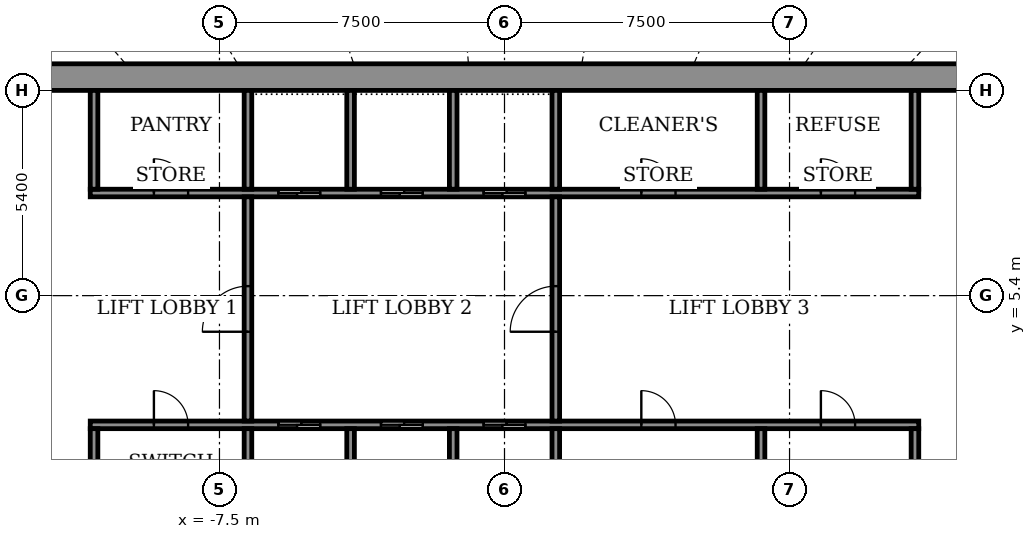
"""IFC4 building model, lengths in metres.
Left out: names, types, materials, properties, quantities, classifications, styles, units other than length and angle.
Written with IfcOpenShell. Run it as: python <this file> out.ifc"""

import sys

from ifc_helpers import new_model, si_unit, direction, frame, frame_2d, origin, place, context, subcontext, project, spatial, rectangle, extrude, element, fill, save


model = new_model("IFC4")
c1 = context("Model", 3, precision=1e-05, world=origin(), true_north=direction((0.0, 1.0)))
c2 = subcontext(c1, "Body", "Model", "MODEL_VIEW")
j1 = project(units=[si_unit("LENGTHUNIT", "METRE"), si_unit("PLANEANGLEUNIT", "RADIAN")], contexts=[c1])
p1 = place(None, origin())
s1 = spatial("IfcSite", under=j1, at=p1, CompositionType="ELEMENT")
p2 = place(p1, origin())
s2 = spatial("IfcBuilding", under=s1, at=p2, CompositionType="ELEMENT")
p3 = place(p2, frame((0.0, 0.0, 275.3)))
s3 = spatial("IfcBuildingStorey", under=s2, at=p3, CompositionType="ELEMENT", Elevation=275.3)
p4 = place(p3, frame((-14.5, 11.15, 0.0), z_axis=(0.0, 0.0, 1.0), x_axis=(1.0, 0.0, 0.0)))
e1 = element("IfcWall", 1, at=p4, inside=s3, PredefinedType="SHEAR", context=c2, shape_type="SweptSolid", body=[
    extrude(rectangle(XDim=29.0, YDim=0.7, at=frame_2d((14.5, 0.0))), origin(), (0.0, 0.0, 1.0), 4.6),
])
p5 = place(p3, frame((-10.9, 2.0, 0.0), z_axis=(0.0, 0.0, 1.0), x_axis=(1.0, 0.0, 0.0)))
e2 = element("IfcWall", 2, at=p5, inside=s3, PredefinedType="SHEAR", context=c2, shape_type="SweptSolid", body=[
    extrude(rectangle(XDim=21.8, YDim=0.2, at=frame_2d((10.9, 0.0))), origin(), (0.0, 0.0, 1.0), 4.05),
])
p6 = place(p5, frame((4.95, 0.0, 0.0)))
e3 = element("IfcOpeningElement", 3, at=p6, cuts=e2, PredefinedType="OPENING", context=c2, shape_type="SweptSolid", body=[
    extrude(rectangle(XDim=1.1, YDim=2.1, at=frame_2d((0.55, 1.05))), frame((0.0, 0.11, 0.0), z_axis=(0.0, -1.0, 0.0), x_axis=(1.0, 0.0, 0.0)), (0.0, 0.0, 1.0), 0.22),
])
p7 = place(p5, frame((7.65, 0.0, 0.0)))
e4 = element("IfcOpeningElement", 4, at=p7, cuts=e2, PredefinedType="OPENING", context=c2, shape_type="SweptSolid", body=[
    extrude(rectangle(XDim=1.1, YDim=2.1, at=frame_2d((0.55, 1.05))), frame((0.0, 0.11, 0.0), z_axis=(0.0, -1.0, 0.0), x_axis=(1.0, 0.0, 0.0)), (0.0, 0.0, 1.0), 0.22),
])
p8 = place(p5, frame((10.35, 0.0, 0.0)))
e5 = element("IfcOpeningElement", 5, at=p8, cuts=e2, PredefinedType="OPENING", context=c2, shape_type="SweptSolid", body=[
    extrude(rectangle(XDim=1.1, YDim=2.1, at=frame_2d((0.55, 1.05))), frame((0.0, 0.11, 0.0), z_axis=(0.0, -1.0, 0.0), x_axis=(1.0, 0.0, 0.0)), (0.0, 0.0, 1.0), 0.22),
])
p9 = place(p5, frame((1.675, 0.0, 0.0)))
e6 = element("IfcOpeningElement", 6, at=p9, cuts=e2, PredefinedType="OPENING", context=c2, shape_type="SweptSolid", body=[
    extrude(rectangle(XDim=0.9, YDim=2.1, at=frame_2d((0.45, 1.05))), frame((0.0, 0.11, 0.0), z_axis=(0.0, -1.0, 0.0), x_axis=(1.0, 0.0, 0.0)), (0.0, 0.0, 1.0), 0.22),
])
p10 = place(p5, frame((14.5, 0.0, 0.0)))
e7 = element("IfcOpeningElement", 7, at=p10, cuts=e2, PredefinedType="OPENING", context=c2, shape_type="SweptSolid", body=[
    extrude(rectangle(XDim=0.9, YDim=2.1, at=frame_2d((0.45, 1.05))), frame((0.0, 0.11, 0.0), z_axis=(0.0, -1.0, 0.0), x_axis=(1.0, 0.0, 0.0)), (0.0, 0.0, 1.0), 0.22),
])
p11 = place(p5, frame((19.225, 0.0, 0.0)))
e8 = element("IfcOpeningElement", 8, at=p11, cuts=e2, PredefinedType="OPENING", context=c2, shape_type="SweptSolid", body=[
    extrude(rectangle(XDim=0.9, YDim=2.1, at=frame_2d((0.45, 1.05))), frame((0.0, 0.11, 0.0), z_axis=(0.0, -1.0, 0.0), x_axis=(1.0, 0.0, 0.0)), (0.0, 0.0, 1.0), 0.22),
])
p12 = place(p3, frame((-10.9, 8.1, 0.0), z_axis=(0.0, 0.0, 1.0), x_axis=(1.0, 0.0, 0.0)))
e9 = element("IfcWall", 9, at=p12, inside=s3, PredefinedType="SHEAR", context=c2, shape_type="SweptSolid", body=[
    extrude(rectangle(XDim=21.8, YDim=0.2, at=frame_2d((10.9, 0.0))), origin(), (0.0, 0.0, 1.0), 4.05),
])
p13 = place(p12, frame((4.95, 0.0, 0.0)))
e10 = element("IfcOpeningElement", 10, at=p13, cuts=e9, PredefinedType="OPENING", context=c2, shape_type="SweptSolid", body=[
    extrude(rectangle(XDim=1.1, YDim=2.1, at=frame_2d((0.55, 1.05))), frame((0.0, 0.11, 0.0), z_axis=(0.0, -1.0, 0.0), x_axis=(1.0, 0.0, 0.0)), (0.0, 0.0, 1.0), 0.22),
])
p14 = place(p12, frame((7.65, 0.0, 0.0)))
e11 = element("IfcOpeningElement", 11, at=p14, cuts=e9, PredefinedType="OPENING", context=c2, shape_type="SweptSolid", body=[
    extrude(rectangle(XDim=1.1, YDim=2.1, at=frame_2d((0.55, 1.05))), frame((0.0, 0.11, 0.0), z_axis=(0.0, -1.0, 0.0), x_axis=(1.0, 0.0, 0.0)), (0.0, 0.0, 1.0), 0.22),
])
p15 = place(p12, frame((10.35, 0.0, 0.0)))
e12 = element("IfcOpeningElement", 12, at=p15, cuts=e9, PredefinedType="OPENING", context=c2, shape_type="SweptSolid", body=[
    extrude(rectangle(XDim=1.1, YDim=2.1, at=frame_2d((0.55, 1.05))), frame((0.0, 0.11, 0.0), z_axis=(0.0, -1.0, 0.0), x_axis=(1.0, 0.0, 0.0)), (0.0, 0.0, 1.0), 0.22),
])
p16 = place(p12, frame((1.675, 0.0, 0.0)))
e13 = element("IfcOpeningElement", 13, at=p16, cuts=e9, PredefinedType="OPENING", context=c2, shape_type="SweptSolid", body=[
    extrude(rectangle(XDim=0.9, YDim=2.1, at=frame_2d((0.45, 1.05))), frame((0.0, 0.11, 0.0), z_axis=(0.0, -1.0, 0.0), x_axis=(1.0, 0.0, 0.0)), (0.0, 0.0, 1.0), 0.22),
])
p17 = place(p12, frame((14.5, 0.0, 0.0)))
e14 = element("IfcOpeningElement", 14, at=p17, cuts=e9, PredefinedType="OPENING", context=c2, shape_type="SweptSolid", body=[
    extrude(rectangle(XDim=0.9, YDim=2.1, at=frame_2d((0.45, 1.05))), frame((0.0, 0.11, 0.0), z_axis=(0.0, -1.0, 0.0), x_axis=(1.0, 0.0, 0.0)), (0.0, 0.0, 1.0), 0.22),
])
p18 = place(p12, frame((19.225, 0.0, 0.0)))
e15 = element("IfcOpeningElement", 15, at=p18, cuts=e9, PredefinedType="OPENING", context=c2, shape_type="SweptSolid", body=[
    extrude(rectangle(XDim=0.9, YDim=2.1, at=frame_2d((0.45, 1.05))), frame((0.0, 0.11, 0.0), z_axis=(0.0, -1.0, 0.0), x_axis=(1.0, 0.0, 0.0)), (0.0, 0.0, 1.0), 0.22),
])
p19 = place(p3, frame((-10.8, -0.6, 0.0), z_axis=(0.0, 0.0, 1.0), x_axis=(0.0, 1.0, 0.0)))
e16 = element("IfcWall", 16, at=p19, inside=s3, PredefinedType="STANDARD", context=c2, shape_type="SweptSolid", body=[
    extrude(rectangle(XDim=2.5, YDim=0.2, at=frame_2d((1.25, 0.0))), origin(), (0.0, 0.0, 1.0), 4.05),
])
for number, where, z_axis, x_axis in (
    (17, (-6.75, -0.6, 0.0), (0.0, 0.0, 1.0), (0.0, 1.0, 0.0)),
    (18, (-4.05, -0.6, 0.0), (0.0, 0.0, 1.0), (0.0, 1.0, 0.0)),
    (19, (-1.35, -0.6, 0.0), (0.0, 0.0, 1.0), (0.0, 1.0, 0.0)),
    (20, (1.35, -0.6, 0.0), (0.0, 0.0, 1.0), (0.0, 1.0, 0.0)),
):
    element("IfcWall", number, at=place(p3, frame(where, z_axis=z_axis, x_axis=x_axis)), inside=s3, PredefinedType="SHEAR", context=c2, shape_type="SweptSolid", body=[
        extrude(rectangle(XDim=2.5, YDim=0.2, at=frame_2d((1.25, 0.0))), origin(), (0.0, 0.0, 1.0), 4.05),
    ])
for number, where, z_axis, x_axis in (
    (21, (6.75, -0.6, 0.0), (0.0, 0.0, 1.0), (0.0, 1.0, 0.0)),
    (22, (10.8, -0.6, 0.0), (0.0, 0.0, 1.0), (0.0, 1.0, 0.0)),
):
    element("IfcWall", number, at=place(p3, frame(where, z_axis=z_axis, x_axis=x_axis)), inside=s3, PredefinedType="STANDARD", context=c2, shape_type="SweptSolid", body=[
        extrude(rectangle(XDim=2.5, YDim=0.2, at=frame_2d((1.25, 0.0))), origin(), (0.0, 0.0, 1.0), 4.05),
    ])
p20 = place(p3, frame((-10.8, 8.2, 0.0), z_axis=(0.0, 0.0, 1.0), x_axis=(0.0, 1.0, 0.0)))
e23 = element("IfcWall", 23, at=p20, inside=s3, PredefinedType="STANDARD", context=c2, shape_type="SweptSolid", body=[
    extrude(rectangle(XDim=2.6, YDim=0.2, at=frame_2d((1.3, 0.0))), origin(), (0.0, 0.0, 1.0), 4.05),
])
for number, where, z_axis, x_axis in (
    (24, (-6.75, 8.2, 0.0), (0.0, 0.0, 1.0), (0.0, 1.0, 0.0)),
    (25, (-4.05, 8.2, 0.0), (0.0, 0.0, 1.0), (0.0, 1.0, 0.0)),
    (26, (-1.35, 8.2, 0.0), (0.0, 0.0, 1.0), (0.0, 1.0, 0.0)),
    (27, (1.35, 8.2, 0.0), (0.0, 0.0, 1.0), (0.0, 1.0, 0.0)),
):
    element("IfcWall", number, at=place(p3, frame(where, z_axis=z_axis, x_axis=x_axis)), inside=s3, PredefinedType="SHEAR", context=c2, shape_type="SweptSolid", body=[
        extrude(rectangle(XDim=2.6, YDim=0.2, at=frame_2d((1.3, 0.0))), origin(), (0.0, 0.0, 1.0), 4.05),
    ])
for number, where, z_axis, x_axis in (
    (28, (6.75, 8.2, 0.0), (0.0, 0.0, 1.0), (0.0, 1.0, 0.0)),
    (29, (10.8, 8.2, 0.0), (0.0, 0.0, 1.0), (0.0, 1.0, 0.0)),
):
    element("IfcWall", number, at=place(p3, frame(where, z_axis=z_axis, x_axis=x_axis)), inside=s3, PredefinedType="STANDARD", context=c2, shape_type="SweptSolid", body=[
        extrude(rectangle(XDim=2.6, YDim=0.2, at=frame_2d((1.3, 0.0))), origin(), (0.0, 0.0, 1.0), 4.05),
    ])
p21 = place(p3, frame((-6.75, 2.1, 0.0), z_axis=(0.0, 0.0, 1.0), x_axis=(0.0, 1.0, 0.0)))
e30 = element("IfcWall", 30, at=p21, inside=s3, PredefinedType="STANDARD", context=c2, shape_type="SweptSolid", body=[
    extrude(rectangle(XDim=5.9, YDim=0.2, at=frame_2d((2.95, 0.0))), origin(), (0.0, 0.0, 1.0), 4.05),
])
p22 = place(p21, frame((2.35, 0.0, 0.0)))
e31 = element("IfcOpeningElement", 31, at=p22, cuts=e30, PredefinedType="OPENING", context=c2, shape_type="SweptSolid", body=[
    extrude(rectangle(XDim=1.2, YDim=2.1, at=frame_2d((0.6, 1.05))), frame((0.0, 0.11, 0.0), z_axis=(0.0, -1.0, 0.0), x_axis=(1.0, 0.0, 0.0)), (0.0, 0.0, 1.0), 0.22),
])
p23 = place(p3, frame((1.35, 2.1, 0.0), z_axis=(0.0, 0.0, 1.0), x_axis=(0.0, 1.0, 0.0)))
e32 = element("IfcWall", 32, at=p23, inside=s3, PredefinedType="STANDARD", context=c2, shape_type="SweptSolid", body=[
    extrude(rectangle(XDim=5.9, YDim=0.2, at=frame_2d((2.95, 0.0))), origin(), (0.0, 0.0, 1.0), 4.05),
])
p24 = place(p23, frame((2.35, 0.0, 0.0)))
e33 = element("IfcOpeningElement", 33, at=p24, cuts=e32, PredefinedType="OPENING", context=c2, shape_type="SweptSolid", body=[
    extrude(rectangle(XDim=1.2, YDim=2.1, at=frame_2d((0.6, 1.05))), frame((0.0, 0.11, 0.0), z_axis=(0.0, -1.0, 0.0), x_axis=(1.0, 0.0, 0.0)), (0.0, 0.0, 1.0), 0.22),
])
p25 = place(p6, origin())
e34 = element("IfcDoor", 34, at=p25, inside=s3, OperationType="SLIDING_TO_LEFT", PredefinedType="DOOR", context=c2, shape_type="SweptSolid", body=[
    extrude(rectangle(XDim=1.1, YDim=2.1, at=frame_2d((0.55, 1.05))), frame((0.0, 0.025, 0.0), z_axis=(0.0, -1.0, 0.0), x_axis=(1.0, 0.0, 0.0)), (0.0, 0.0, 1.0), 0.05),
])
fill(e3, e34)
p26 = place(p7, origin())
e35 = element("IfcDoor", 35, at=p26, inside=s3, OperationType="SLIDING_TO_LEFT", PredefinedType="DOOR", context=c2, shape_type="SweptSolid", body=[
    extrude(rectangle(XDim=1.1, YDim=2.1, at=frame_2d((0.55, 1.05))), frame((0.0, 0.025, 0.0), z_axis=(0.0, -1.0, 0.0), x_axis=(1.0, 0.0, 0.0)), (0.0, 0.0, 1.0), 0.05),
])
fill(e4, e35)
p27 = place(p8, origin())
e36 = element("IfcDoor", 36, at=p27, inside=s3, OperationType="SLIDING_TO_LEFT", PredefinedType="DOOR", context=c2, shape_type="SweptSolid", body=[
    extrude(rectangle(XDim=1.1, YDim=2.1, at=frame_2d((0.55, 1.05))), frame((0.0, 0.025, 0.0), z_axis=(0.0, -1.0, 0.0), x_axis=(1.0, 0.0, 0.0)), (0.0, 0.0, 1.0), 0.05),
])
fill(e5, e36)
p28 = place(p13, origin())
e37 = element("IfcDoor", 37, at=p28, inside=s3, OperationType="SLIDING_TO_LEFT", PredefinedType="DOOR", context=c2, shape_type="SweptSolid", body=[
    extrude(rectangle(XDim=1.1, YDim=2.1, at=frame_2d((0.55, 1.05))), frame((0.0, 0.025, 0.0), z_axis=(0.0, -1.0, 0.0), x_axis=(1.0, 0.0, 0.0)), (0.0, 0.0, 1.0), 0.05),
])
fill(e10, e37)
p29 = place(p14, origin())
e38 = element("IfcDoor", 38, at=p29, inside=s3, OperationType="SLIDING_TO_LEFT", PredefinedType="DOOR", context=c2, shape_type="SweptSolid", body=[
    extrude(rectangle(XDim=1.1, YDim=2.1, at=frame_2d((0.55, 1.05))), frame((0.0, 0.025, 0.0), z_axis=(0.0, -1.0, 0.0), x_axis=(1.0, 0.0, 0.0)), (0.0, 0.0, 1.0), 0.05),
])
fill(e11, e38)
p30 = place(p15, origin())
e39 = element("IfcDoor", 39, at=p30, inside=s3, OperationType="SLIDING_TO_LEFT", PredefinedType="DOOR", context=c2, shape_type="SweptSolid", body=[
    extrude(rectangle(XDim=1.1, YDim=2.1, at=frame_2d((0.55, 1.05))), frame((0.0, 0.025, 0.0), z_axis=(0.0, -1.0, 0.0), x_axis=(1.0, 0.0, 0.0)), (0.0, 0.0, 1.0), 0.05),
])
fill(e12, e39)
p31 = place(p9, origin())
e40 = element("IfcDoor", 40, at=p31, inside=s3, OperationType="SINGLE_SWING_LEFT", PredefinedType="DOOR", context=c2, shape_type="SweptSolid", body=[
    extrude(rectangle(XDim=0.9, YDim=2.1, at=frame_2d((0.45, 1.05))), frame((0.0, 0.025, 0.0), z_axis=(0.0, -1.0, 0.0), x_axis=(1.0, 0.0, 0.0)), (0.0, 0.0, 1.0), 0.05),
])
fill(e6, e40)
p32 = place(p10, origin())
e41 = element("IfcDoor", 41, at=p32, inside=s3, OperationType="SINGLE_SWING_LEFT", PredefinedType="DOOR", context=c2, shape_type="SweptSolid", body=[
    extrude(rectangle(XDim=0.9, YDim=2.1, at=frame_2d((0.45, 1.05))), frame((0.0, 0.025, 0.0), z_axis=(0.0, -1.0, 0.0), x_axis=(1.0, 0.0, 0.0)), (0.0, 0.0, 1.0), 0.05),
])
fill(e7, e41)
p33 = place(p11, origin())
e42 = element("IfcDoor", 42, at=p33, inside=s3, OperationType="SINGLE_SWING_RIGHT", PredefinedType="DOOR", context=c2, shape_type="SweptSolid", body=[
    extrude(rectangle(XDim=0.9, YDim=2.1, at=frame_2d((0.45, 1.05))), frame((0.0, 0.025, 0.0), z_axis=(0.0, -1.0, 0.0), x_axis=(1.0, 0.0, 0.0)), (0.0, 0.0, 1.0), 0.05),
])
fill(e8, e42)
p34 = place(p16, origin())
e43 = element("IfcDoor", 43, at=p34, inside=s3, OperationType="SINGLE_SWING_RIGHT", PredefinedType="DOOR", context=c2, shape_type="SweptSolid", body=[
    extrude(rectangle(XDim=0.9, YDim=2.1, at=frame_2d((0.45, 1.05))), frame((0.0, 0.025, 0.0), z_axis=(0.0, -1.0, 0.0), x_axis=(1.0, 0.0, 0.0)), (0.0, 0.0, 1.0), 0.05),
])
fill(e13, e43)
p35 = place(p17, origin())
e44 = element("IfcDoor", 44, at=p35, inside=s3, OperationType="SINGLE_SWING_RIGHT", PredefinedType="DOOR", context=c2, shape_type="SweptSolid", body=[
    extrude(rectangle(XDim=0.9, YDim=2.1, at=frame_2d((0.45, 1.05))), frame((0.0, 0.025, 0.0), z_axis=(0.0, -1.0, 0.0), x_axis=(1.0, 0.0, 0.0)), (0.0, 0.0, 1.0), 0.05),
])
fill(e14, e44)
p36 = place(p18, origin())
e45 = element("IfcDoor", 45, at=p36, inside=s3, OperationType="SINGLE_SWING_RIGHT", PredefinedType="DOOR", context=c2, shape_type="SweptSolid", body=[
    extrude(rectangle(XDim=0.9, YDim=2.1, at=frame_2d((0.45, 1.05))), frame((0.0, 0.025, 0.0), z_axis=(0.0, -1.0, 0.0), x_axis=(1.0, 0.0, 0.0)), (0.0, 0.0, 1.0), 0.05),
])
fill(e15, e45)
p37 = place(p22, origin())
e46 = element("IfcDoor", 46, at=p37, inside=s3, OperationType="SINGLE_SWING_LEFT", PredefinedType="DOOR", context=c2, shape_type="SweptSolid", body=[
    extrude(rectangle(XDim=1.2, YDim=2.1, at=frame_2d((0.6, 1.05))), frame((0.0, 0.025, 0.0), z_axis=(0.0, -1.0, 0.0), x_axis=(1.0, 0.0, 0.0)), (0.0, 0.0, 1.0), 0.05),
])
fill(e31, e46)
p38 = place(p24, origin())
e47 = element("IfcDoor", 47, at=p38, inside=s3, OperationType="SINGLE_SWING_LEFT", PredefinedType="DOOR", context=c2, shape_type="SweptSolid", body=[
    extrude(rectangle(XDim=1.2, YDim=2.1, at=frame_2d((0.6, 1.05))), frame((0.0, 0.025, 0.0), z_axis=(0.0, -1.0, 0.0), x_axis=(1.0, 0.0, 0.0)), (0.0, 0.0, 1.0), 0.05),
])
fill(e33, e47)
save(model, sys.argv[1])
